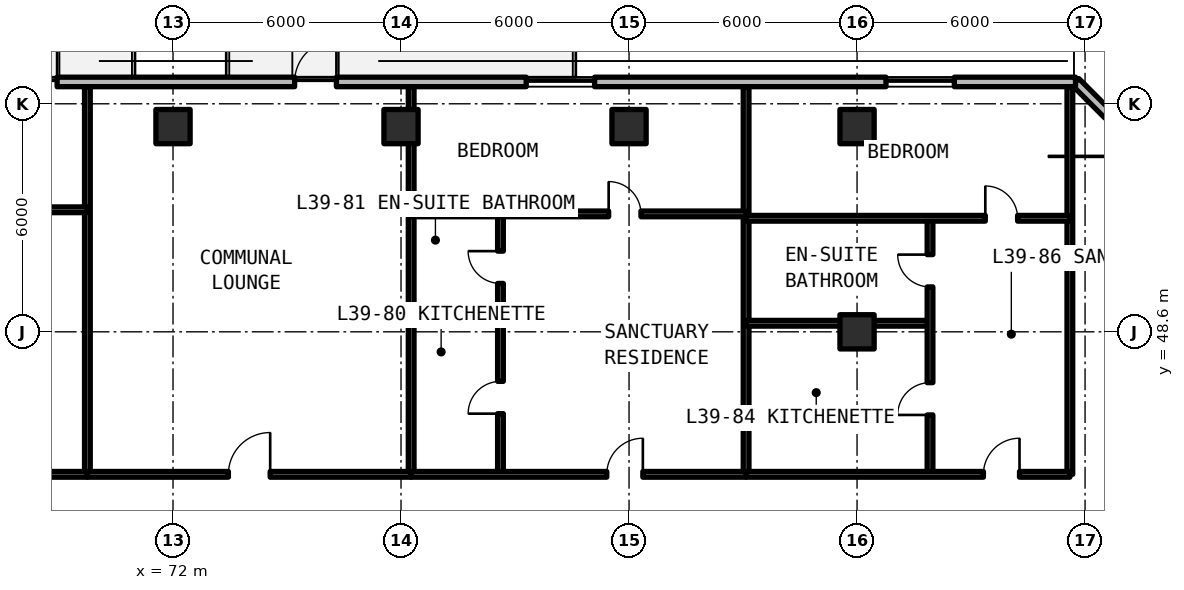
"""IFC4 building model, lengths in metres.
Left out: names, types, materials, properties, quantities, classifications, styles, units other than length and angle.
Written with IfcOpenShell. Run it as: python <this file> out.ifc"""

import sys

from ifc_helpers import new_model, si_unit, direction, frame, frame_2d, origin, origin_2d, place, context, subcontext, project, spatial, rectangle, extrude, element, fill, save


model = new_model("IFC4")
c1 = context("Model", 3, precision=1e-05, world=origin(), true_north=direction((0.0, 1.0)))
c2 = subcontext(c1, "Body", "Model", "MODEL_VIEW")
j1 = project(units=[si_unit("LENGTHUNIT", "METRE"), si_unit("PLANEANGLEUNIT", "RADIAN")], contexts=[c1])
p1 = place(None, origin())
s1 = spatial("IfcSite", under=j1, at=p1, CompositionType="ELEMENT")
p2 = place(p1, origin())
s2 = spatial("IfcBuilding", under=s1, at=p2, CompositionType="ELEMENT")
p3 = place(p2, frame((0.0, 0.0, 141.9)))
s3 = spatial("IfcBuildingStorey", under=s2, at=p3, CompositionType="ELEMENT", Elevation=141.9)
for number, where, z_axis, x_axis in (
    (1, (90.0, 48.6, 0.0), (0.0, 0.0, 1.0), (1.0, 0.0, 0.0)),
    (2, (72.0, 54.0, 0.0), (0.0, 0.0, 1.0), (1.0, 0.0, 0.0)),
    (3, (78.0, 54.0, 0.0), (0.0, 0.0, 1.0), (1.0, 0.0, 0.0)),
    (4, (84.0, 54.0, 0.0), (0.0, 0.0, 1.0), (1.0, 0.0, 0.0)),
    (5, (90.0, 54.0, 0.0), (0.0, 0.0, 1.0), (1.0, 0.0, 0.0)),
):
    element("IfcColumn", number, at=place(p3, frame(where, z_axis=z_axis, x_axis=x_axis)), inside=s3, PredefinedType="COLUMN", context=c2, shape_type="SweptSolid", body=[
        extrude(rectangle(XDim=0.9, YDim=0.9, at=origin_2d()), origin(), (0.0, 0.0, 1.0), 3.3),
    ])
p4 = place(p3, frame((99.875, 51.048, 0.0), z_axis=(0.0, 0.0, 1.0), x_axis=(-0.70708586489, 0.707127696864, 0.0)))
e6 = element("IfcWall", 6, at=p4, inside=s3, PredefinedType="SOLIDWALL", context=c2, shape_type="SweptSolid", body=[
    extrude(rectangle(XDim=5.836, YDim=0.25, at=frame_2d((2.918, 0.0))), origin(), (0.0, 0.0, 1.0), 3.08),
])
p5 = place(p4, frame((1.218, 0.0, 0.78)))
e7 = element("IfcOpeningElement", 7, at=p5, cuts=e6, PredefinedType="OPENING", context=c2, shape_type="SweptSolid", body=[
    extrude(rectangle(XDim=3.4, YDim=1.66, at=frame_2d((1.7, 0.83))), frame((0.0, 0.135, 0.0), z_axis=(0.0, -1.0, 0.0), x_axis=(1.0, 0.0, 0.0)), (0.0, 0.0, 1.0), 0.27),
])
p6 = place(p3, frame((95.748, 55.175, 0.0), z_axis=(0.0, 0.0, 1.0), x_axis=(-1.0, 0.0, 0.0)))
e8 = element("IfcWall", 8, at=p6, inside=s3, PredefinedType="SOLIDWALL", context=c2, shape_type="SweptSolid", body=[
    extrude(rectangle(XDim=43.623, YDim=0.25, at=frame_2d((21.812, 0.0))), origin(), (0.0, 0.0, 1.0), 3.08),
])
p7 = place(p6, frame((26.798, 0.0, 0.0)))
e9 = element("IfcOpeningElement", 9, at=p7, cuts=e8, PredefinedType="OPENING", context=c2, shape_type="SweptSolid", body=[
    extrude(rectangle(XDim=1.1, YDim=2.15, at=frame_2d((0.55, 1.075))), frame((0.0, 0.135, 0.0), z_axis=(0.0, -1.0, 0.0), x_axis=(1.0, 0.0, 0.0)), (0.0, 0.0, 1.0), 0.27),
])
p8 = place(p6, frame((19.448, 0.0, 0.0)))
e10 = element("IfcOpeningElement", 10, at=p8, cuts=e8, PredefinedType="OPENING", context=c2, shape_type="SweptSolid", body=[
    extrude(rectangle(XDim=1.1, YDim=2.15, at=frame_2d((0.55, 1.075))), frame((0.0, 0.135, 0.0), z_axis=(0.0, -1.0, 0.0), x_axis=(1.0, 0.0, 0.0)), (0.0, 0.0, 1.0), 0.27),
])
p9 = place(p6, frame((38.468, 0.0, 0.78)))
e11 = element("IfcOpeningElement", 11, at=p9, cuts=e8, PredefinedType="OPENING", context=c2, shape_type="SweptSolid", body=[
    extrude(rectangle(XDim=1.8, YDim=1.66, at=frame_2d((0.9, 0.83))), frame((0.0, 0.135, 0.0), z_axis=(0.0, -1.0, 0.0), x_axis=(1.0, 0.0, 0.0)), (0.0, 0.0, 1.0), 0.27),
])
p10 = place(p6, frame((12.655, 0.0, 0.78)))
e12 = element("IfcOpeningElement", 12, at=p10, cuts=e8, PredefinedType="OPENING", context=c2, shape_type="SweptSolid", body=[
    extrude(rectangle(XDim=1.8, YDim=1.66, at=frame_2d((0.9, 0.83))), frame((0.0, 0.135, 0.0), z_axis=(0.0, -1.0, 0.0), x_axis=(1.0, 0.0, 0.0)), (0.0, 0.0, 1.0), 0.27),
])
p11 = place(p6, frame((3.188, 0.0, 0.78)))
e13 = element("IfcOpeningElement", 13, at=p11, cuts=e8, PredefinedType="OPENING", context=c2, shape_type="SweptSolid", body=[
    extrude(rectangle(XDim=1.8, YDim=1.66, at=frame_2d((0.9, 0.83))), frame((0.0, 0.135, 0.0), z_axis=(0.0, -1.0, 0.0), x_axis=(1.0, 0.0, 0.0)), (0.0, 0.0, 1.0), 0.27),
])
for number, where, z_axis, x_axis in (
    (14, (95.6, 44.85, 0.0), (0.0, 0.0, 1.0), (0.0, 1.0, 0.0)),
    (15, (69.747, 44.85, 0.0), (0.0, 0.0, 1.0), (0.0, 1.0, 0.0)),
):
    element("IfcWall", number, at=place(p3, frame(where, z_axis=z_axis, x_axis=x_axis)), inside=s3, PredefinedType="SOLIDWALL", context=c2, shape_type="SweptSolid", body=[
        extrude(rectangle(XDim=10.2, YDim=0.15, at=frame_2d((5.1, 0.0))), origin(), (0.0, 0.0, 1.0), 2.35),
    ])
p12 = place(p3, frame((60.64, 51.811, 0.0), z_axis=(0.0, 0.0, 1.0), x_axis=(1.0, 0.0, 0.0)))
e16 = element("IfcWall", 16, at=p12, inside=s3, PredefinedType="PARTITIONING", context=c2, shape_type="SweptSolid", body=[
    extrude(rectangle(XDim=9.107, YDim=0.15, at=frame_2d((4.554, 0.0))), origin(), (0.0, 0.0, 1.0), 2.35),
])
p13 = place(p12, frame((5.344, 0.0, 0.0)))
e17 = element("IfcOpeningElement", 17, at=p13, cuts=e16, PredefinedType="OPENING", context=c2, shape_type="SweptSolid", body=[
    extrude(rectangle(XDim=0.85, YDim=2.1, at=frame_2d((0.425, 1.05))), frame((0.0, 0.085, 0.0), z_axis=(0.0, -1.0, 0.0), x_axis=(1.0, 0.0, 0.0)), (0.0, 0.0, 1.0), 0.17),
])
p14 = place(p3, frame((60.64, 44.85, 0.0), z_axis=(0.0, 0.0, 1.0), x_axis=(1.0, 0.0, 0.0)))
e18 = element("IfcWall", 18, at=p14, inside=s3, PredefinedType="SOLIDWALL", context=c2, shape_type="SweptSolid", body=[
    extrude(rectangle(XDim=9.107, YDim=0.15, at=frame_2d((4.554, 0.0))), origin(), (0.0, 0.0, 1.0), 2.35),
])
p15 = place(p14, frame((5.294, 0.0, 0.0)))
e19 = element("IfcOpeningElement", 19, at=p15, cuts=e18, PredefinedType="OPENING", context=c2, shape_type="SweptSolid", body=[
    extrude(rectangle(XDim=0.95, YDim=2.15, at=frame_2d((0.475, 1.075))), frame((0.0, 0.085, 0.0), z_axis=(0.0, -1.0, 0.0), x_axis=(1.0, 0.0, 0.0)), (0.0, 0.0, 1.0), 0.17),
])
p16 = place(p3, frame((78.267, 44.85, 0.0), z_axis=(0.0, 0.0, 1.0), x_axis=(0.0, 1.0, 0.0)))
e20 = element("IfcWall", 20, at=p16, inside=s3, PredefinedType="SOLIDWALL", context=c2, shape_type="SweptSolid", body=[
    extrude(rectangle(XDim=10.2, YDim=0.15, at=frame_2d((5.1, 0.0))), origin(), (0.0, 0.0, 1.0), 2.35),
])
p17 = place(p3, frame((69.747, 44.85, 0.0), z_axis=(0.0, 0.0, 1.0), x_axis=(1.0, 0.0, 0.0)))
e21 = element("IfcWall", 21, at=p17, inside=s3, PredefinedType="SOLIDWALL", context=c2, shape_type="SweptSolid", body=[
    extrude(rectangle(XDim=8.52, YDim=0.15, at=frame_2d((4.26, 0.0))), origin(), (0.0, 0.0, 1.0), 2.35),
])
p18 = place(p17, frame((3.71, 0.0, 0.0)))
e22 = element("IfcOpeningElement", 22, at=p18, cuts=e21, PredefinedType="OPENING", context=c2, shape_type="SweptSolid", body=[
    extrude(rectangle(XDim=1.1, YDim=2.15, at=frame_2d((0.55, 1.075))), frame((0.0, 0.085, 0.0), z_axis=(0.0, -1.0, 0.0), x_axis=(1.0, 0.0, 0.0)), (0.0, 0.0, 1.0), 0.17),
])
p19 = place(p3, frame((87.08, 44.85, 0.0), z_axis=(0.0, 0.0, 1.0), x_axis=(0.0, 1.0, 0.0)))
e23 = element("IfcWall", 23, at=p19, inside=s3, PredefinedType="SOLIDWALL", context=c2, shape_type="SweptSolid", body=[
    extrude(rectangle(XDim=10.2, YDim=0.15, at=frame_2d((5.1, 0.0))), origin(), (0.0, 0.0, 1.0), 2.35),
])
p20 = place(p3, frame((78.267, 48.893, 0.0), z_axis=(0.0, 0.0, 1.0), x_axis=(1.0, 0.0, 0.0)))
e24 = element("IfcWall", 24, at=p20, inside=s3, PredefinedType="PARTITIONING", context=c2, shape_type="SweptSolid", body=[
    extrude(rectangle(XDim=2.35, YDim=0.15, at=frame_2d((1.175, 0.0))), origin(), (0.0, 0.0, 1.0), 2.35),
])
p21 = place(p3, frame((80.617, 44.85, 0.0), z_axis=(0.0, 0.0, 1.0), x_axis=(0.0, 1.0, 0.0)))
e25 = element("IfcWall", 25, at=p21, inside=s3, PredefinedType="PARTITIONING", context=c2, shape_type="SweptSolid", body=[
    extrude(rectangle(XDim=6.853, YDim=0.15, at=frame_2d((3.426, 0.0))), origin(), (0.0, 0.0, 1.0), 2.35),
])
p22 = place(p21, frame((1.597, 0.0, 0.0)))
e26 = element("IfcOpeningElement", 26, at=p22, cuts=e25, PredefinedType="OPENING", context=c2, shape_type="SweptSolid", body=[
    extrude(rectangle(XDim=0.85, YDim=2.1, at=frame_2d((0.425, 1.05))), frame((0.0, 0.085, 0.0), z_axis=(0.0, -1.0, 0.0), x_axis=(1.0, 0.0, 0.0)), (0.0, 0.0, 1.0), 0.17),
])
p23 = place(p21, frame((5.023, 0.0, 0.0)))
e27 = element("IfcOpeningElement", 27, at=p23, cuts=e25, PredefinedType="OPENING", context=c2, shape_type="SweptSolid", body=[
    extrude(rectangle(XDim=0.85, YDim=2.1, at=frame_2d((0.425, 1.05))), frame((0.0, 0.085, 0.0), z_axis=(0.0, -1.0, 0.0), x_axis=(1.0, 0.0, 0.0)), (0.0, 0.0, 1.0), 0.17),
])
p24 = place(p3, frame((78.267, 51.703, 0.0), z_axis=(0.0, 0.0, 1.0), x_axis=(1.0, 0.0, 0.0)))
e28 = element("IfcWall", 28, at=p24, inside=s3, PredefinedType="PARTITIONING", context=c2, shape_type="SweptSolid", body=[
    extrude(rectangle(XDim=8.813, YDim=0.15, at=frame_2d((4.407, 0.0))), origin(), (0.0, 0.0, 1.0), 2.35),
])
p25 = place(p24, frame((5.197, 0.0, 0.0)))
e29 = element("IfcOpeningElement", 29, at=p25, cuts=e28, PredefinedType="OPENING", context=c2, shape_type="SweptSolid", body=[
    extrude(rectangle(XDim=0.85, YDim=2.1, at=frame_2d((0.425, 1.05))), frame((0.0, 0.085, 0.0), z_axis=(0.0, -1.0, 0.0), x_axis=(1.0, 0.0, 0.0)), (0.0, 0.0, 1.0), 0.17),
])
p26 = place(p3, frame((78.267, 44.85, 0.0), z_axis=(0.0, 0.0, 1.0), x_axis=(1.0, 0.0, 0.0)))
e30 = element("IfcWall", 30, at=p26, inside=s3, PredefinedType="SOLIDWALL", context=c2, shape_type="SweptSolid", body=[
    extrude(rectangle(XDim=8.813, YDim=0.15, at=frame_2d((4.407, 0.0))), origin(), (0.0, 0.0, 1.0), 2.35),
])
p27 = place(p26, frame((5.147, 0.0, 0.0)))
e31 = element("IfcOpeningElement", 31, at=p27, cuts=e30, PredefinedType="OPENING", context=c2, shape_type="SweptSolid", body=[
    extrude(rectangle(XDim=0.95, YDim=2.15, at=frame_2d((0.475, 1.075))), frame((0.0, 0.085, 0.0), z_axis=(0.0, -1.0, 0.0), x_axis=(1.0, 0.0, 0.0)), (0.0, 0.0, 1.0), 0.17),
])
p28 = place(p3, frame((87.08, 48.825, 0.0), z_axis=(0.0, 0.0, 1.0), x_axis=(1.0, 0.0, 0.0)))
e32 = element("IfcWall", 32, at=p28, inside=s3, PredefinedType="PARTITIONING", context=c2, shape_type="SweptSolid", body=[
    extrude(rectangle(XDim=4.84, YDim=0.15, at=frame_2d((2.42, 0.0))), origin(), (0.0, 0.0, 1.0), 2.35),
])
p29 = place(p3, frame((91.92, 44.85, 0.0), z_axis=(0.0, 0.0, 1.0), x_axis=(0.0, 1.0, 0.0)))
e33 = element("IfcWall", 33, at=p29, inside=s3, PredefinedType="PARTITIONING", context=c2, shape_type="SweptSolid", body=[
    extrude(rectangle(XDim=6.737, YDim=0.15, at=frame_2d((3.369, 0.0))), origin(), (0.0, 0.0, 1.0), 2.35),
])
p30 = place(p29, frame((1.562, 0.0, 0.0)))
e34 = element("IfcOpeningElement", 34, at=p30, cuts=e33, PredefinedType="OPENING", context=c2, shape_type="SweptSolid", body=[
    extrude(rectangle(XDim=0.85, YDim=2.1, at=frame_2d((0.425, 1.05))), frame((0.0, 0.085, 0.0), z_axis=(0.0, -1.0, 0.0), x_axis=(1.0, 0.0, 0.0)), (0.0, 0.0, 1.0), 0.17),
])
p31 = place(p29, frame((4.931, 0.0, 0.0)))
e35 = element("IfcOpeningElement", 35, at=p31, cuts=e33, PredefinedType="OPENING", context=c2, shape_type="SweptSolid", body=[
    extrude(rectangle(XDim=0.85, YDim=2.1, at=frame_2d((0.425, 1.05))), frame((0.0, 0.085, 0.0), z_axis=(0.0, -1.0, 0.0), x_axis=(1.0, 0.0, 0.0)), (0.0, 0.0, 1.0), 0.17),
])
p32 = place(p3, frame((87.08, 51.587, 0.0), z_axis=(0.0, 0.0, 1.0), x_axis=(1.0, 0.0, 0.0)))
e36 = element("IfcWall", 36, at=p32, inside=s3, PredefinedType="PARTITIONING", context=c2, shape_type="SweptSolid", body=[
    extrude(rectangle(XDim=8.52, YDim=0.15, at=frame_2d((4.26, 0.0))), origin(), (0.0, 0.0, 1.0), 2.35),
])
p33 = place(p32, frame((6.295, 0.0, 0.0)))
e37 = element("IfcOpeningElement", 37, at=p33, cuts=e36, PredefinedType="OPENING", context=c2, shape_type="SweptSolid", body=[
    extrude(rectangle(XDim=0.85, YDim=2.1, at=frame_2d((0.425, 1.05))), frame((0.0, 0.085, 0.0), z_axis=(0.0, -1.0, 0.0), x_axis=(1.0, 0.0, 0.0)), (0.0, 0.0, 1.0), 0.17),
])
p34 = place(p3, frame((87.08, 44.85, 0.0), z_axis=(0.0, 0.0, 1.0), x_axis=(1.0, 0.0, 0.0)))
e38 = element("IfcWall", 38, at=p34, inside=s3, PredefinedType="SOLIDWALL", context=c2, shape_type="SweptSolid", body=[
    extrude(rectangle(XDim=8.52, YDim=0.15, at=frame_2d((4.26, 0.0))), origin(), (0.0, 0.0, 1.0), 2.35),
])
p35 = place(p34, frame((6.245, 0.0, 0.0)))
e39 = element("IfcOpeningElement", 39, at=p35, cuts=e38, PredefinedType="OPENING", context=c2, shape_type="SweptSolid", body=[
    extrude(rectangle(XDim=0.95, YDim=2.15, at=frame_2d((0.475, 1.075))), frame((0.0, 0.085, 0.0), z_axis=(0.0, -1.0, 0.0), x_axis=(1.0, 0.0, 0.0)), (0.0, 0.0, 1.0), 0.17),
])
p36 = place(p7, frame((1.1, 0.0, 0.0), z_axis=(0.0, 0.0, 1.0), x_axis=(-1.0, 0.0, 0.0)))
e40 = element("IfcDoor", 40, at=p36, inside=s3, OperationType="SINGLE_SWING_LEFT", PredefinedType="DOOR", context=c2, shape_type="SweptSolid", body=[
    extrude(rectangle(XDim=1.1, YDim=2.15, at=frame_2d((0.55, 1.075))), frame((0.0, 0.025, 0.0), z_axis=(0.0, -1.0, 0.0), x_axis=(1.0, 0.0, 0.0)), (0.0, 0.0, 1.0), 0.05),
])
fill(e9, e40)
p37 = place(p8, frame((1.1, 0.0, 0.0), z_axis=(0.0, 0.0, 1.0), x_axis=(-1.0, 0.0, 0.0)))
e41 = element("IfcDoor", 41, at=p37, inside=s3, OperationType="SINGLE_SWING_RIGHT", PredefinedType="DOOR", context=c2, shape_type="SweptSolid", body=[
    extrude(rectangle(XDim=1.1, YDim=2.15, at=frame_2d((0.55, 1.075))), frame((0.0, 0.025, 0.0), z_axis=(0.0, -1.0, 0.0), x_axis=(1.0, 0.0, 0.0)), (0.0, 0.0, 1.0), 0.05),
])
fill(e10, e41)
p38 = place(p10, origin())
e42 = element("IfcWindow", 42, at=p38, inside=s3, PartitioningType="SINGLE_PANEL", PredefinedType="WINDOW", context=c2, shape_type="SweptSolid", body=[
    extrude(rectangle(XDim=1.8, YDim=1.66, at=frame_2d((0.9, 0.83))), frame((0.0, 0.03, 0.0), z_axis=(0.0, -1.0, 0.0), x_axis=(1.0, 0.0, 0.0)), (0.0, 0.0, 1.0), 0.06),
])
fill(e12, e42)
p39 = place(p11, origin())
e43 = element("IfcWindow", 43, at=p39, inside=s3, PartitioningType="SINGLE_PANEL", PredefinedType="WINDOW", context=c2, shape_type="SweptSolid", body=[
    extrude(rectangle(XDim=1.8, YDim=1.66, at=frame_2d((0.9, 0.83))), frame((0.0, 0.03, 0.0), z_axis=(0.0, -1.0, 0.0), x_axis=(1.0, 0.0, 0.0)), (0.0, 0.0, 1.0), 0.06),
])
fill(e13, e43)
p40 = place(p18, origin())
e44 = element("IfcDoor", 44, at=p40, inside=s3, OperationType="SINGLE_SWING_RIGHT", PredefinedType="DOOR", context=c2, shape_type="SweptSolid", body=[
    extrude(rectangle(XDim=1.1, YDim=2.15, at=frame_2d((0.55, 1.075))), frame((0.0, 0.025, 0.0), z_axis=(0.0, -1.0, 0.0), x_axis=(1.0, 0.0, 0.0)), (0.0, 0.0, 1.0), 0.05),
])
fill(e22, e44)
p41 = place(p22, origin())
e45 = element("IfcDoor", 45, at=p41, inside=s3, OperationType="SINGLE_SWING_LEFT", PredefinedType="DOOR", context=c2, shape_type="SweptSolid", body=[
    extrude(rectangle(XDim=0.85, YDim=2.1, at=frame_2d((0.425, 1.05))), frame((0.0, 0.025, 0.0), z_axis=(0.0, -1.0, 0.0), x_axis=(1.0, 0.0, 0.0)), (0.0, 0.0, 1.0), 0.05),
])
fill(e26, e45)
p42 = place(p23, origin())
e46 = element("IfcDoor", 46, at=p42, inside=s3, OperationType="SINGLE_SWING_RIGHT", PredefinedType="DOOR", context=c2, shape_type="SweptSolid", body=[
    extrude(rectangle(XDim=0.85, YDim=2.1, at=frame_2d((0.425, 1.05))), frame((0.0, 0.025, 0.0), z_axis=(0.0, -1.0, 0.0), x_axis=(1.0, 0.0, 0.0)), (0.0, 0.0, 1.0), 0.05),
])
fill(e27, e46)
p43 = place(p25, origin())
e47 = element("IfcDoor", 47, at=p43, inside=s3, OperationType="SINGLE_SWING_LEFT", PredefinedType="DOOR", context=c2, shape_type="SweptSolid", body=[
    extrude(rectangle(XDim=0.85, YDim=2.1, at=frame_2d((0.425, 1.05))), frame((0.0, 0.025, 0.0), z_axis=(0.0, -1.0, 0.0), x_axis=(1.0, 0.0, 0.0)), (0.0, 0.0, 1.0), 0.05),
])
fill(e29, e47)
p44 = place(p27, origin())
e48 = element("IfcDoor", 48, at=p44, inside=s3, OperationType="SINGLE_SWING_RIGHT", PredefinedType="DOOR", context=c2, shape_type="SweptSolid", body=[
    extrude(rectangle(XDim=0.95, YDim=2.15, at=frame_2d((0.475, 1.075))), frame((0.0, 0.025, 0.0), z_axis=(0.0, -1.0, 0.0), x_axis=(1.0, 0.0, 0.0)), (0.0, 0.0, 1.0), 0.05),
])
fill(e31, e48)
p45 = place(p30, origin())
e49 = element("IfcDoor", 49, at=p45, inside=s3, OperationType="SINGLE_SWING_LEFT", PredefinedType="DOOR", context=c2, shape_type="SweptSolid", body=[
    extrude(rectangle(XDim=0.85, YDim=2.1, at=frame_2d((0.425, 1.05))), frame((0.0, 0.025, 0.0), z_axis=(0.0, -1.0, 0.0), x_axis=(1.0, 0.0, 0.0)), (0.0, 0.0, 1.0), 0.05),
])
fill(e34, e49)
p46 = place(p31, origin())
e50 = element("IfcDoor", 50, at=p46, inside=s3, OperationType="SINGLE_SWING_RIGHT", PredefinedType="DOOR", context=c2, shape_type="SweptSolid", body=[
    extrude(rectangle(XDim=0.85, YDim=2.1, at=frame_2d((0.425, 1.05))), frame((0.0, 0.025, 0.0), z_axis=(0.0, -1.0, 0.0), x_axis=(1.0, 0.0, 0.0)), (0.0, 0.0, 1.0), 0.05),
])
fill(e35, e50)
p47 = place(p33, origin())
e51 = element("IfcDoor", 51, at=p47, inside=s3, OperationType="SINGLE_SWING_LEFT", PredefinedType="DOOR", context=c2, shape_type="SweptSolid", body=[
    extrude(rectangle(XDim=0.85, YDim=2.1, at=frame_2d((0.425, 1.05))), frame((0.0, 0.025, 0.0), z_axis=(0.0, -1.0, 0.0), x_axis=(1.0, 0.0, 0.0)), (0.0, 0.0, 1.0), 0.05),
])
fill(e37, e51)
p48 = place(p35, origin())
e52 = element("IfcDoor", 52, at=p48, inside=s3, OperationType="SINGLE_SWING_RIGHT", PredefinedType="DOOR", context=c2, shape_type="SweptSolid", body=[
    extrude(rectangle(XDim=0.95, YDim=2.15, at=frame_2d((0.475, 1.075))), frame((0.0, 0.025, 0.0), z_axis=(0.0, -1.0, 0.0), x_axis=(1.0, 0.0, 0.0)), (0.0, 0.0, 1.0), 0.05),
])
fill(e39, e52)
save(model, sys.argv[1])
